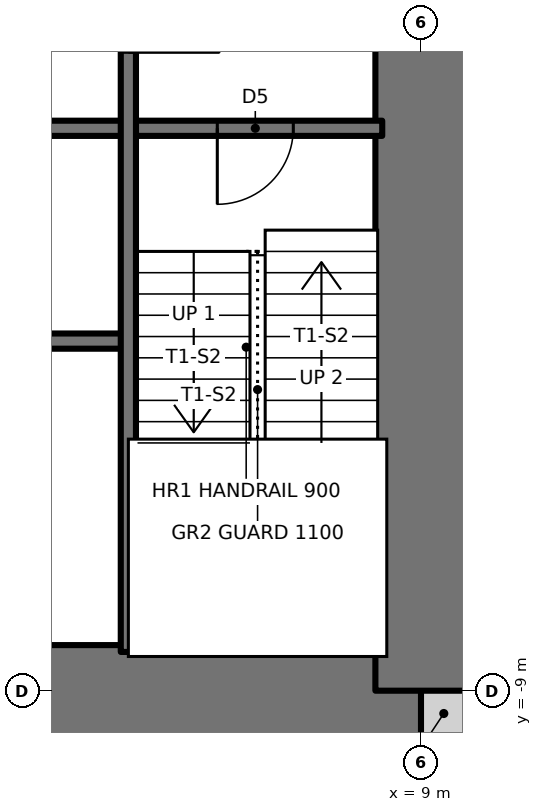
"""IFC4 building model, lengths in metres.
Left out: names, types, materials, properties, quantities, classifications, styles, units other than length and angle.
Written with IfcOpenShell. Run it as: python <this file> out.ifc"""

import sys

from ifc_helpers import new_model, si_unit, direction, frame, frame_2d, origin, place, context, subcontext, project, spatial, rectangle, extrude, element, fill, save


model = new_model("IFC4")
c1 = context("Model", 3, precision=1e-05, world=origin(), true_north=direction((0.0, 1.0)))
c2 = subcontext(c1, "Body", "Model", "MODEL_VIEW")
j1 = project(units=[si_unit("LENGTHUNIT", "METRE"), si_unit("PLANEANGLEUNIT", "RADIAN")], contexts=[c1])
p1 = place(None, origin())
s1 = spatial("IfcSite", under=j1, at=p1, CompositionType="ELEMENT")
p2 = place(p1, origin())
s2 = spatial("IfcBuilding", under=s1, at=p2, CompositionType="ELEMENT")
p3 = place(p2, frame((0.0, 0.0, 236.0)))
s3 = spatial("IfcBuildingStorey", under=s2, at=p3, CompositionType="ELEMENT", Elevation=236.0)
p4 = place(p3, frame((9.0, -9.3, 0.0), z_axis=(0.0, 0.0, 1.0), x_axis=(1.0, 0.0, 0.0)))
e1 = element("IfcWall", 1, at=p4, inside=s3, PredefinedType="SOLIDWALL", context=c2, shape_type="SweptSolid", body=[
    extrude(rectangle(XDim=0.6, YDim=0.6, at=frame_2d((0.3, 0.0))), origin(), (0.0, 0.0, 1.0), 3.5),
])
p5 = place(p3, frame((-9.0, -9.0, 0.0), z_axis=(0.0, 0.0, 1.0), x_axis=(1.0, 0.0, 0.0)))
e2 = element("IfcWall", 2, at=p5, inside=s3, PredefinedType="SHEAR", context=c2, shape_type="SweptSolid", body=[
    extrude(rectangle(XDim=18.0, YDim=1.2, at=frame_2d((9.0, 0.0))), origin(), (0.0, 0.0, 1.0), 3.5),
])
p6 = place(p5, frame((3.775, 0.0, 0.0)))
e3 = element("IfcOpeningElement", 3, at=p6, cuts=e2, PredefinedType="OPENING", context=c2, shape_type="SweptSolid", body=[
    extrude(rectangle(XDim=0.9, YDim=2.1, at=frame_2d((0.45, 1.05))), frame((0.0, 0.61, 0.0), z_axis=(0.0, -1.0, 0.0), x_axis=(1.0, 0.0, 0.0)), (0.0, 0.0, 1.0), 1.22),
])
p7 = place(p5, frame((10.625, 0.0, 0.0)))
e4 = element("IfcOpeningElement", 4, at=p7, cuts=e2, PredefinedType="OPENING", context=c2, shape_type="SweptSolid", body=[
    extrude(rectangle(XDim=0.9, YDim=2.1, at=frame_2d((0.45, 1.05))), frame((0.0, 0.61, 0.0), z_axis=(0.0, -1.0, 0.0), x_axis=(1.0, 0.0, 0.0)), (0.0, 0.0, 1.0), 1.22),
])
p8 = place(p3, frame((9.0, -9.0, 0.0), z_axis=(0.0, 0.0, 1.0), x_axis=(0.0, 1.0, 0.0)))
e5 = element("IfcWall", 5, at=p8, inside=s3, PredefinedType="SHEAR", context=c2, shape_type="SweptSolid", body=[
    extrude(rectangle(XDim=18.0, YDim=1.2, at=frame_2d((9.0, 0.0))), origin(), (0.0, 0.0, 1.0), 3.5),
])
p9 = place(p8, frame((8.5, 0.0, 0.0)))
e6 = element("IfcOpeningElement", 6, at=p9, cuts=e5, PredefinedType="OPENING", context=c2, shape_type="SweptSolid", body=[
    extrude(rectangle(XDim=1.0, YDim=2.1, at=frame_2d((0.5, 1.05))), frame((0.0, 0.61, 0.0), z_axis=(0.0, -1.0, 0.0), x_axis=(1.0, 0.0, 0.0)), (0.0, 0.0, 1.0), 1.22),
])
p10 = place(p3, frame((-8.49, -4.4, 0.0), z_axis=(0.0, 0.0, 1.0), x_axis=(1.0, 0.0, 0.0)))
e7 = element("IfcWall", 7, at=p10, inside=s3, PredefinedType="SOLIDWALL", context=c2, shape_type="SweptSolid", body=[
    extrude(rectangle(XDim=13.64, YDim=0.2, at=frame_2d((6.82, 0.0))), origin(), (0.0, 0.0, 1.0), 3.5),
])
p11 = place(p3, frame((-8.49, -1.6, 0.0), z_axis=(0.0, 0.0, 1.0), x_axis=(1.0, 0.0, 0.0)))
e8 = element("IfcWall", 8, at=p11, inside=s3, PredefinedType="SOLIDWALL", context=c2, shape_type="SweptSolid", body=[
    extrude(rectangle(XDim=16.98, YDim=0.2, at=frame_2d((8.49, 0.0))), origin(), (0.0, 0.0, 1.0), 3.5),
])
p12 = place(p11, frame((14.81, 0.0, 0.0)))
e9 = element("IfcOpeningElement", 9, at=p12, cuts=e8, PredefinedType="OPENING", context=c2, shape_type="SweptSolid", body=[
    extrude(rectangle(XDim=1.0, YDim=2.1, at=frame_2d((0.5, 1.05))), frame((0.0, 0.11, 0.0), z_axis=(0.0, -1.0, 0.0), x_axis=(1.0, 0.0, 0.0)), (0.0, 0.0, 1.0), 0.22),
])
p13 = place(p11, frame((1.232, 0.0, 0.0)))
e10 = element("IfcOpeningElement", 10, at=p13, cuts=e8, PredefinedType="OPENING", context=c2, shape_type="SweptSolid", body=[
    extrude(rectangle(XDim=0.9, YDim=2.1, at=frame_2d((0.45, 1.05))), frame((0.0, 0.11, 0.0), z_axis=(0.0, -1.0, 0.0), x_axis=(1.0, 0.0, 0.0)), (0.0, 0.0, 1.0), 0.22),
])
p14 = place(p11, frame((4.627, 0.0, 0.0)))
e11 = element("IfcOpeningElement", 11, at=p14, cuts=e8, PredefinedType="OPENING", context=c2, shape_type="SweptSolid", body=[
    extrude(rectangle(XDim=0.9, YDim=2.1, at=frame_2d((0.45, 1.05))), frame((0.0, 0.11, 0.0), z_axis=(0.0, -1.0, 0.0), x_axis=(1.0, 0.0, 0.0)), (0.0, 0.0, 1.0), 0.22),
])
p15 = place(p11, frame((8.052, 0.0, 0.0)))
e12 = element("IfcOpeningElement", 12, at=p15, cuts=e8, PredefinedType="OPENING", context=c2, shape_type="SweptSolid", body=[
    extrude(rectangle(XDim=0.9, YDim=2.1, at=frame_2d((0.45, 1.05))), frame((0.0, 0.11, 0.0), z_axis=(0.0, -1.0, 0.0), x_axis=(1.0, 0.0, 0.0)), (0.0, 0.0, 1.0), 0.22),
])
p16 = place(p11, frame((11.478, 0.0, 0.0)))
e13 = element("IfcOpeningElement", 13, at=p16, cuts=e8, PredefinedType="OPENING", context=c2, shape_type="SweptSolid", body=[
    extrude(rectangle(XDim=0.9, YDim=2.1, at=frame_2d((0.45, 1.05))), frame((0.0, 0.11, 0.0), z_axis=(0.0, -1.0, 0.0), x_axis=(1.0, 0.0, 0.0)), (0.0, 0.0, 1.0), 0.22),
])
p17 = place(p3, frame((5.15, -8.49, 0.0), z_axis=(0.0, 0.0, 1.0), x_axis=(0.0, 1.0, 0.0)))
e14 = element("IfcWall", 14, at=p17, inside=s3, PredefinedType="SOLIDWALL", context=c2, shape_type="SweptSolid", body=[
    extrude(rectangle(XDim=13.09, YDim=0.2, at=frame_2d((6.545, 0.0))), origin(), (0.0, 0.0, 1.0), 3.5),
])
p18 = place(p17, frame((7.89, 0.0, 0.0)))
e15 = element("IfcOpeningElement", 15, at=p18, cuts=e14, PredefinedType="OPENING", context=c2, shape_type="SweptSolid", body=[
    extrude(rectangle(XDim=1.2, YDim=2.1, at=frame_2d((0.6, 1.05))), frame((0.0, 0.11, 0.0), z_axis=(0.0, -1.0, 0.0), x_axis=(1.0, 0.0, 0.0)), (0.0, 0.0, 1.0), 0.22),
])
p19 = place(p12, frame((1.0, 0.0, 0.0), z_axis=(0.0, 0.0, 1.0), x_axis=(-1.0, 0.0, 0.0)))
e16 = element("IfcDoor", 16, at=p19, inside=s3, OperationType="SINGLE_SWING_RIGHT", PredefinedType="DOOR", context=c2, shape_type="SweptSolid", body=[
    extrude(rectangle(XDim=1.0, YDim=2.1, at=frame_2d((0.5, 1.05))), frame((0.0, 0.025, 0.0), z_axis=(0.0, -1.0, 0.0), x_axis=(1.0, 0.0, 0.0)), (0.0, 0.0, 1.0), 0.05),
])
fill(e9, e16)
p20 = place(p18, frame((1.2, 0.0, 0.0), z_axis=(0.0, 0.0, 1.0), x_axis=(-1.0, 0.0, 0.0)))
e17 = element("IfcDoor", 17, at=p20, inside=s3, OperationType="SINGLE_SWING_RIGHT", PredefinedType="DOOR", context=c2, shape_type="SweptSolid", body=[
    extrude(rectangle(XDim=1.2, YDim=2.1, at=frame_2d((0.6, 1.05))), frame((0.0, 0.025, 0.0), z_axis=(0.0, -1.0, 0.0), x_axis=(1.0, 0.0, 0.0)), (0.0, 0.0, 1.0), 0.05),
])
fill(e15, e17)
save(model, sys.argv[1])
